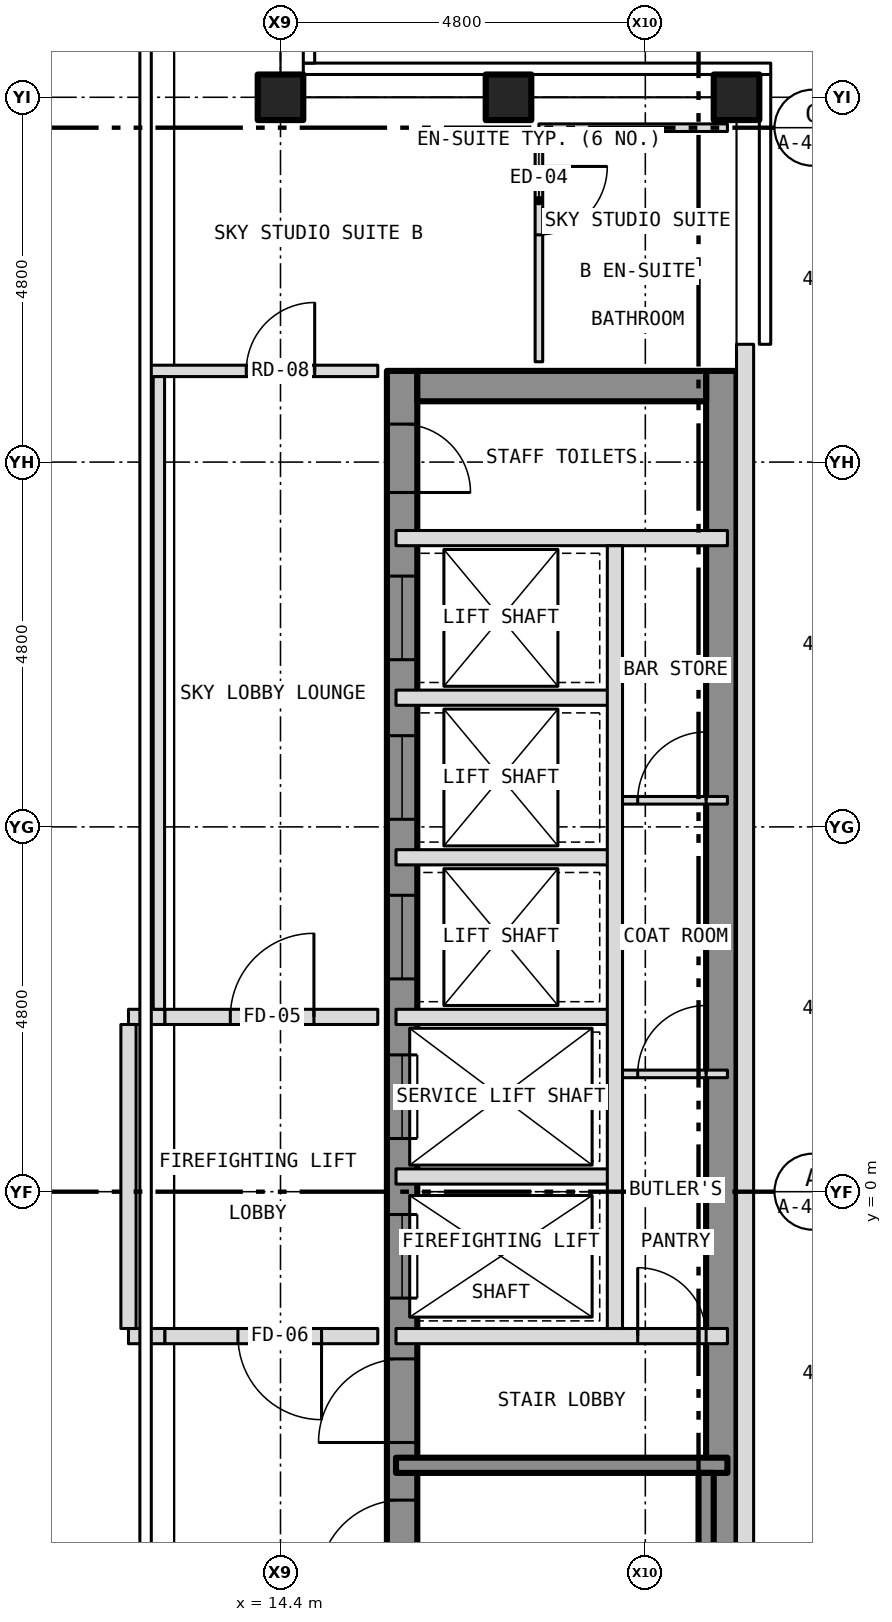
"""IFC4 building model, lengths in metres.
Left out: names, types, materials, properties, quantities, classifications, styles, units other than length and angle.
Written with IfcOpenShell. Run it as: python <this file> out.ifc"""

import sys

from ifc_helpers import new_model, si_unit, direction, frame, frame_2d, origin, origin_2d, place, context, subcontext, project, spatial, rectangle, hollow_rectangle, extrude, element, fill, save


model = new_model("IFC4")
c1 = context("Model", 3, precision=1e-05, world=origin(), true_north=direction((0.0, 1.0)))
c2 = subcontext(c1, "Body", "Model", "MODEL_VIEW")
j1 = project(units=[si_unit("LENGTHUNIT", "METRE"), si_unit("PLANEANGLEUNIT", "RADIAN")], contexts=[c1])
p1 = place(None, origin())
s1 = spatial("IfcSite", under=j1, at=p1, CompositionType="ELEMENT")
p2 = place(p1, origin())
s2 = spatial("IfcBuilding", under=s1, at=p2, CompositionType="ELEMENT")
p3 = place(p2, frame((0.0, 0.0, 286.5)))
s3 = spatial("IfcBuildingStorey", under=s2, at=p3, CompositionType="ELEMENT", Elevation=286.5)
for number, where, z_axis, x_axis in (
    (1, (20.4, 14.4, -0.15), (0.0, 0.0, 1.0), (1.0, 0.0, 0.0)),
    (2, (14.4, 14.4, -0.15), (0.0, 0.0, 1.0), (1.0, 0.0, 0.0)),
    (3, (17.4, 14.4, -0.15), (0.0, 0.0, 1.0), (1.0, 0.0, 0.0)),
):
    element("IfcColumn", number, at=place(p3, frame(where, z_axis=z_axis, x_axis=x_axis)), inside=s3, PredefinedType="COLUMN", context=c2, shape_type="SweptSolid", body=[
        extrude(hollow_rectangle(XDim=0.6, YDim=0.6, WallThickness=0.03, at=origin_2d()), origin(), (0.0, 0.0, 1.0), 3.45),
    ])
p4 = place(p3, frame((16.0, -10.8, 0.0), z_axis=(0.0, 0.0, 1.0), x_axis=(0.0, 1.0, 0.0)))
e4 = element("IfcWall", 4, at=p4, inside=s3, PredefinedType="SHEAR", context=c2, shape_type="SweptSolid", body=[
    extrude(rectangle(XDim=21.6, YDim=0.4, at=frame_2d((10.8, 0.0))), origin(), (0.0, 0.0, 1.0), 3.25),
])
p5 = place(p4, frame((9.4, 0.0, 0.0)))
e5 = element("IfcOpeningElement", 5, at=p5, cuts=e4, PredefinedType="OPENING", context=c2, shape_type="SweptSolid", body=[
    extrude(rectangle(XDim=1.1, YDim=2.1, at=frame_2d((0.55, 1.05))), frame((0.0, 0.212, 0.0), z_axis=(0.0, -1.0, 0.0), x_axis=(1.0, 0.0, 0.0)), (0.0, 0.0, 1.0), 0.424),
])
p6 = place(p4, frame((11.5, 0.0, 0.0)))
e6 = element("IfcOpeningElement", 6, at=p6, cuts=e4, PredefinedType="OPENING", context=c2, shape_type="SweptSolid", body=[
    extrude(rectangle(XDim=1.1, YDim=2.1, at=frame_2d((0.55, 1.05))), frame((0.0, 0.212, 0.0), z_axis=(0.0, -1.0, 0.0), x_axis=(1.0, 0.0, 0.0)), (0.0, 0.0, 1.0), 0.424),
])
p7 = place(p4, frame((13.6, 0.0, 0.0)))
e7 = element("IfcOpeningElement", 7, at=p7, cuts=e4, PredefinedType="OPENING", context=c2, shape_type="SweptSolid", body=[
    extrude(rectangle(XDim=1.1, YDim=2.1, at=frame_2d((0.55, 1.05))), frame((0.0, 0.212, 0.0), z_axis=(0.0, -1.0, 0.0), x_axis=(1.0, 0.0, 0.0)), (0.0, 0.0, 1.0), 0.424),
])
p8 = place(p4, frame((15.7, 0.0, 0.0)))
e8 = element("IfcOpeningElement", 8, at=p8, cuts=e4, PredefinedType="OPENING", context=c2, shape_type="SweptSolid", body=[
    extrude(rectangle(XDim=1.1, YDim=2.1, at=frame_2d((0.55, 1.05))), frame((0.0, 0.212, 0.0), z_axis=(0.0, -1.0, 0.0), x_axis=(1.0, 0.0, 0.0)), (0.0, 0.0, 1.0), 0.424),
])
p9 = place(p4, frame((17.8, 0.0, 0.0)))
e9 = element("IfcOpeningElement", 9, at=p9, cuts=e4, PredefinedType="OPENING", context=c2, shape_type="SweptSolid", body=[
    extrude(rectangle(XDim=1.1, YDim=2.1, at=frame_2d((0.55, 1.05))), frame((0.0, 0.212, 0.0), z_axis=(0.0, -1.0, 0.0), x_axis=(1.0, 0.0, 0.0)), (0.0, 0.0, 1.0), 0.424),
])
p10 = place(p4, frame((5.642, 0.0, 0.0)))
e10 = element("IfcOpeningElement", 10, at=p10, cuts=e4, PredefinedType="OPENING", context=c2, shape_type="SweptSolid", body=[
    extrude(rectangle(XDim=1.1, YDim=2.1, at=frame_2d((0.55, 1.05))), frame((0.0, 0.212, 0.0), z_axis=(0.0, -1.0, 0.0), x_axis=(1.0, 0.0, 0.0)), (0.0, 0.0, 1.0), 0.424),
])
p11 = place(p4, frame((7.5, 0.0, 0.0)))
e11 = element("IfcOpeningElement", 11, at=p11, cuts=e4, PredefinedType="OPENING", context=c2, shape_type="SweptSolid", body=[
    extrude(rectangle(XDim=1.1, YDim=2.1, at=frame_2d((0.55, 1.05))), frame((0.0, 0.212, 0.0), z_axis=(0.0, -1.0, 0.0), x_axis=(1.0, 0.0, 0.0)), (0.0, 0.0, 1.0), 0.424),
])
p12 = place(p4, frame((20.0, 0.0, 0.0)))
e12 = element("IfcOpeningElement", 12, at=p12, cuts=e4, PredefinedType="OPENING", context=c2, shape_type="SweptSolid", body=[
    extrude(rectangle(XDim=0.9, YDim=2.1, at=frame_2d((0.45, 1.05))), frame((0.0, 0.212, 0.0), z_axis=(0.0, -1.0, 0.0), x_axis=(1.0, 0.0, 0.0)), (0.0, 0.0, 1.0), 0.424),
])
p13 = place(p3, frame((20.2, -10.8, 0.0), z_axis=(0.0, 0.0, 1.0), x_axis=(0.0, 1.0, 0.0)))
e13 = element("IfcWall", 13, at=p13, inside=s3, PredefinedType="SHEAR", context=c2, shape_type="SweptSolid", body=[
    extrude(rectangle(XDim=21.6, YDim=0.4, at=frame_2d((10.8, 0.0))), origin(), (0.0, 0.0, 1.0), 3.25),
])
p14 = place(p3, frame((16.2, 10.6, 0.0), z_axis=(0.0, 0.0, 1.0), x_axis=(1.0, 0.0, 0.0)))
e14 = element("IfcWall", 14, at=p14, inside=s3, PredefinedType="SHEAR", context=c2, shape_type="SweptSolid", body=[
    extrude(rectangle(XDim=3.8, YDim=0.4, at=frame_2d((1.9, 0.0))), origin(), (0.0, 0.0, 1.0), 3.25),
])
p15 = place(p3, frame((20.512, -11.15, 0.0), z_axis=(0.0, 0.0, 1.0), x_axis=(0.0, 1.0, 0.0)))
e15 = element("IfcWall", 15, at=p15, inside=s3, PredefinedType="SOLIDWALL", context=c2, shape_type="SweptSolid", body=[
    extrude(rectangle(XDim=22.3, YDim=0.225, at=frame_2d((11.15, 0.0))), origin(), (0.0, 0.0, 1.0), 3.5),
])
p16 = place(p15, frame((3.3, 0.0, 1.0)))
e16 = element("IfcOpeningElement", 16, at=p16, cuts=e15, PredefinedType="OPENING", context=c2, shape_type="SweptSolid", body=[
    extrude(rectangle(XDim=0.6, YDim=1.5, at=frame_2d((0.3, 0.75))), frame((0.0, 0.125, 0.0), z_axis=(0.0, -1.0, 0.0), x_axis=(1.0, 0.0, 0.0)), (0.0, 0.0, 1.0), 0.249),
])
p17 = place(p3, frame((15.92, -3.6, 0.0), z_axis=(0.0, 0.0, 1.0), x_axis=(1.0, 0.0, 0.0)))
e17 = element("IfcWall", 17, at=p17, inside=s3, PredefinedType="SHEAR", context=c2, shape_type="SweptSolid", body=[
    extrude(rectangle(XDim=4.36, YDim=0.2, at=frame_2d((2.18, 0.0))), origin(), (0.0, 0.0, 1.0), 3.25),
])
p18 = place(p3, frame((12.4, -1.9, 0.0), z_axis=(0.0, 0.0, 1.0), x_axis=(1.0, 0.0, 0.0)))
e18 = element("IfcWall", 18, at=p18, inside=s3, PredefinedType="PARTITIONING", context=c2, shape_type="SweptSolid", body=[
    extrude(rectangle(XDim=0.48, YDim=0.2, at=frame_2d((0.24, 0.0))), origin(), (0.0, 0.0, 1.0), 3.3),
])
p19 = place(p3, frame((12.88, -1.9, 0.0), z_axis=(0.0, 0.0, 1.0), x_axis=(1.0, 0.0, 0.0)))
e19 = element("IfcWall", 19, at=p19, inside=s3, PredefinedType="PARTITIONING", context=c2, shape_type="SweptSolid", body=[
    extrude(rectangle(XDim=2.8, YDim=0.2, at=frame_2d((1.4, 0.0))), origin(), (0.0, 0.0, 1.0), 3.3),
])
p20 = place(p19, frame((0.96, 0.0, 0.0)))
e20 = element("IfcOpeningElement", 20, at=p20, cuts=e19, PredefinedType="OPENING", context=c2, shape_type="SweptSolid", body=[
    extrude(rectangle(XDim=1.1, YDim=2.1, at=frame_2d((0.55, 1.05))), frame((0.0, 0.112, 0.0), z_axis=(0.0, -1.0, 0.0), x_axis=(1.0, 0.0, 0.0)), (0.0, 0.0, 1.0), 0.224),
])
p21 = place(p3, frame((15.92, -1.9, 0.0), z_axis=(0.0, 0.0, 1.0), x_axis=(1.0, 0.0, 0.0)))
e21 = element("IfcWall", 21, at=p21, inside=s3, PredefinedType="PARTITIONING", context=c2, shape_type="SweptSolid", body=[
    extrude(rectangle(XDim=4.36, YDim=0.2, at=frame_2d((2.18, 0.0))), origin(), (0.0, 0.0, 1.0), 3.25),
])
p22 = place(p21, frame((3.18, 0.0, 0.0)))
e22 = element("IfcOpeningElement", 22, at=p22, cuts=e21, PredefinedType="OPENING", context=c2, shape_type="SweptSolid", body=[
    extrude(rectangle(XDim=0.9, YDim=2.1, at=frame_2d((0.45, 1.05))), frame((0.0, 0.112, 0.0), z_axis=(0.0, -1.0, 0.0), x_axis=(1.0, 0.0, 0.0)), (0.0, 0.0, 1.0), 0.224),
])
p23 = place(p3, frame((15.92, 0.2, 0.0), z_axis=(0.0, 0.0, 1.0), x_axis=(1.0, 0.0, 0.0)))
e23 = element("IfcWall", 23, at=p23, inside=s3, PredefinedType="PARTITIONING", context=c2, shape_type="SweptSolid", body=[
    extrude(rectangle(XDim=2.88, YDim=0.2, at=frame_2d((1.44, 0.0))), origin(), (0.0, 0.0, 1.0), 3.25),
])
p24 = place(p3, frame((18.8, 1.55, 0.0), z_axis=(0.0, 0.0, 1.0), x_axis=(1.0, 0.0, 0.0)))
e24 = element("IfcWall", 24, at=p24, inside=s3, PredefinedType="PARTITIONING", context=c2, shape_type="SweptSolid", body=[
    extrude(rectangle(XDim=1.48, YDim=0.1, at=frame_2d((0.74, 0.0))), origin(), (0.0, 0.0, 1.0), 3.25),
])
p25 = place(p24, frame((0.3, 0.0, 0.0)))
e25 = element("IfcOpeningElement", 25, at=p25, cuts=e24, PredefinedType="OPENING", context=c2, shape_type="SweptSolid", body=[
    extrude(rectangle(XDim=0.9, YDim=2.1, at=frame_2d((0.45, 1.05))), frame((0.0, 0.062, 0.0), z_axis=(0.0, -1.0, 0.0), x_axis=(1.0, 0.0, 0.0)), (0.0, 0.0, 1.0), 0.124),
])
p26 = place(p3, frame((12.4, 2.3, 0.0), z_axis=(0.0, 0.0, 1.0), x_axis=(1.0, 0.0, 0.0)))
e26 = element("IfcWall", 26, at=p26, inside=s3, PredefinedType="PARTITIONING", context=c2, shape_type="SweptSolid", body=[
    extrude(rectangle(XDim=0.48, YDim=0.2, at=frame_2d((0.24, 0.0))), origin(), (0.0, 0.0, 1.0), 3.3),
])
p27 = place(p3, frame((12.88, 2.3, 0.0), z_axis=(0.0, 0.0, 1.0), x_axis=(1.0, 0.0, 0.0)))
e27 = element("IfcWall", 27, at=p27, inside=s3, PredefinedType="PARTITIONING", context=c2, shape_type="SweptSolid", body=[
    extrude(rectangle(XDim=2.8, YDim=0.2, at=frame_2d((1.4, 0.0))), origin(), (0.0, 0.0, 1.0), 3.3),
])
p28 = place(p27, frame((0.86, 0.0, 0.0)))
e28 = element("IfcOpeningElement", 28, at=p28, cuts=e27, PredefinedType="OPENING", context=c2, shape_type="SweptSolid", body=[
    extrude(rectangle(XDim=1.1, YDim=2.1, at=frame_2d((0.55, 1.05))), frame((0.0, 0.112, 0.0), z_axis=(0.0, -1.0, 0.0), x_axis=(1.0, 0.0, 0.0)), (0.0, 0.0, 1.0), 0.224),
])
for number, where, z_axis, x_axis in (
    (29, (15.92, 2.3, 0.0), (0.0, 0.0, 1.0), (1.0, 0.0, 0.0)),
    (30, (15.92, 4.4, 0.0), (0.0, 0.0, 1.0), (1.0, 0.0, 0.0)),
):
    element("IfcWall", number, at=place(p3, frame(where, z_axis=z_axis, x_axis=x_axis)), inside=s3, PredefinedType="PARTITIONING", context=c2, shape_type="SweptSolid", body=[
        extrude(rectangle(XDim=2.88, YDim=0.2, at=frame_2d((1.44, 0.0))), origin(), (0.0, 0.0, 1.0), 3.25),
    ])
p29 = place(p3, frame((18.8, 5.15, 0.0), z_axis=(0.0, 0.0, 1.0), x_axis=(1.0, 0.0, 0.0)))
e31 = element("IfcWall", 31, at=p29, inside=s3, PredefinedType="PARTITIONING", context=c2, shape_type="SweptSolid", body=[
    extrude(rectangle(XDim=1.48, YDim=0.1, at=frame_2d((0.74, 0.0))), origin(), (0.0, 0.0, 1.0), 3.25),
])
p30 = place(p29, frame((0.3, 0.0, 0.0)))
e32 = element("IfcOpeningElement", 32, at=p30, cuts=e31, PredefinedType="OPENING", context=c2, shape_type="SweptSolid", body=[
    extrude(rectangle(XDim=0.9, YDim=2.1, at=frame_2d((0.45, 1.05))), frame((0.0, 0.062, 0.0), z_axis=(0.0, -1.0, 0.0), x_axis=(1.0, 0.0, 0.0)), (0.0, 0.0, 1.0), 0.124),
])
p31 = place(p3, frame((15.92, 6.5, 0.0), z_axis=(0.0, 0.0, 1.0), x_axis=(1.0, 0.0, 0.0)))
e33 = element("IfcWall", 33, at=p31, inside=s3, PredefinedType="PARTITIONING", context=c2, shape_type="SweptSolid", body=[
    extrude(rectangle(XDim=2.88, YDim=0.2, at=frame_2d((1.44, 0.0))), origin(), (0.0, 0.0, 1.0), 3.25),
])
p32 = place(p3, frame((15.92, 8.6, 0.0), z_axis=(0.0, 0.0, 1.0), x_axis=(1.0, 0.0, 0.0)))
e34 = element("IfcWall", 34, at=p32, inside=s3, PredefinedType="PARTITIONING", context=c2, shape_type="SweptSolid", body=[
    extrude(rectangle(XDim=4.36, YDim=0.2, at=frame_2d((2.18, 0.0))), origin(), (0.0, 0.0, 1.0), 3.25),
])
p33 = place(p3, frame((12.67, 10.8, 0.0), z_axis=(0.0, 0.0, 1.0), x_axis=(1.0, 0.0, 0.0)))
e35 = element("IfcWall", 35, at=p33, inside=s3, PredefinedType="PARTITIONING", context=c2, shape_type="SweptSolid", body=[
    extrude(rectangle(XDim=3.01, YDim=0.15, at=frame_2d((1.505, 0.0))), origin(), (0.0, 0.0, 1.0), 3.3),
])
p34 = place(p33, frame((1.28, 0.0, 0.0)))
e36 = element("IfcOpeningElement", 36, at=p34, cuts=e35, PredefinedType="OPENING", context=c2, shape_type="SweptSolid", body=[
    extrude(rectangle(XDim=0.9, YDim=2.1, at=frame_2d((0.45, 1.05))), frame((0.0, 0.087, 0.0), z_axis=(0.0, -1.0, 0.0), x_axis=(1.0, 0.0, 0.0)), (0.0, 0.0, 1.0), 0.174),
])
p35 = place(p3, frame((17.8, 14.0, 0.0), z_axis=(0.0, 0.0, 1.0), x_axis=(1.0, 0.0, 0.0)))
e37 = element("IfcWall", 37, at=p35, inside=s3, PredefinedType="PARTITIONING", context=c2, shape_type="SweptSolid", body=[
    extrude(rectangle(XDim=2.48, YDim=0.1, at=frame_2d((1.24, 0.0))), origin(), (0.0, 0.0, 1.0), 3.3),
])
p36 = place(p3, frame((12.4, -1.8, 0.0), z_axis=(0.0, 0.0, 1.0), x_axis=(0.0, 1.0, 0.0)))
e38 = element("IfcWall", 38, at=p36, inside=s3, PredefinedType="PARTITIONING", context=c2, shape_type="SweptSolid", body=[
    extrude(rectangle(XDim=4.0, YDim=0.2, at=frame_2d((2.0, 0.0))), origin(), (0.0, 0.0, 1.0), 3.3),
])
p37 = place(p3, frame((12.8, 2.4, 0.0), z_axis=(0.0, 0.0, 1.0), x_axis=(0.0, 1.0, 0.0)))
e39 = element("IfcWall", 39, at=p37, inside=s3, PredefinedType="PARTITIONING", context=c2, shape_type="SweptSolid", body=[
    extrude(rectangle(XDim=8.325, YDim=0.15, at=frame_2d((4.163, 0.0))), origin(), (0.0, 0.0, 1.0), 3.3),
])
p38 = place(p3, frame((17.8, 10.92, 0.0), z_axis=(0.0, 0.0, 1.0), x_axis=(0.0, 1.0, 0.0)))
e40 = element("IfcWall", 40, at=p38, inside=s3, PredefinedType="PARTITIONING", context=c2, shape_type="SweptSolid", body=[
    extrude(rectangle(XDim=3.03, YDim=0.1, at=frame_2d((1.515, 0.0))), origin(), (0.0, 0.0, 1.0), 3.3),
])
p39 = place(p38, frame((1.67, 0.0, 0.0)))
e41 = element("IfcOpeningElement", 41, at=p39, cuts=e40, PredefinedType="OPENING", context=c2, shape_type="SweptSolid", body=[
    extrude(rectangle(XDim=0.9, YDim=2.1, at=frame_2d((0.45, 1.05))), frame((0.0, 0.062, 0.0), z_axis=(0.0, -1.0, 0.0), x_axis=(1.0, 0.0, 0.0)), (0.0, 0.0, 1.0), 0.124),
])
p40 = place(p3, frame((18.8, -1.8, 0.0), z_axis=(0.0, 0.0, 1.0), x_axis=(0.0, 1.0, 0.0)))
e42 = element("IfcWall", 42, at=p40, inside=s3, PredefinedType="PARTITIONING", context=c2, shape_type="SweptSolid", body=[
    extrude(rectangle(XDim=10.3, YDim=0.2, at=frame_2d((5.15, 0.0))), origin(), (0.0, 0.0, 1.0), 3.25),
])
p41 = place(p3, frame((20.0, -10.68, 0.0), z_axis=(0.0, 0.0, 1.0), x_axis=(0.0, 1.0, 0.0)))
e43 = element("IfcWall", 43, at=p41, inside=s3, PredefinedType="SHEAR", context=c2, shape_type="SweptSolid", body=[
    extrude(rectangle(XDim=6.98, YDim=0.2, at=frame_2d((3.49, 0.0))), origin(), (0.0, 0.0, 1.0), 3.25),
])
p42 = place(p2, frame((0.0, 0.0, 290.0)))
p43 = place(p42, frame((0.0, 0.0, -0.25)))
p44 = place(p43, frame((19.0, -4.64, 0.0)))
p45 = place(p44, frame((0.0, 0.0, 0.2)))
e44 = element("IfcWindow", 44, at=p45, inside=s3, PartitioningType="SINGLE_PANEL", PredefinedType="SKYLIGHT", context=c2, shape_type="SweptSolid", body=[
    extrude(rectangle(XDim=0.9, YDim=0.9, at=origin_2d()), origin(), (0.0, 0.0, 1.0), 0.05),
])
p46 = place(p5, origin())
e45 = element("IfcDoor", 45, at=p46, inside=s3, OperationType="SLIDING_TO_LEFT", PredefinedType="DOOR", context=c2, shape_type="SweptSolid", body=[
    extrude(rectangle(XDim=1.1, YDim=2.1, at=frame_2d((0.55, 1.05))), frame((0.0, 0.025, 0.0), z_axis=(0.0, -1.0, 0.0), x_axis=(1.0, 0.0, 0.0)), (0.0, 0.0, 1.0), 0.05),
])
fill(e5, e45)
p47 = place(p6, origin())
e46 = element("IfcDoor", 46, at=p47, inside=s3, OperationType="SLIDING_TO_LEFT", PredefinedType="DOOR", context=c2, shape_type="SweptSolid", body=[
    extrude(rectangle(XDim=1.1, YDim=2.1, at=frame_2d((0.55, 1.05))), frame((0.0, 0.025, 0.0), z_axis=(0.0, -1.0, 0.0), x_axis=(1.0, 0.0, 0.0)), (0.0, 0.0, 1.0), 0.05),
])
fill(e6, e46)
p48 = place(p7, origin())
e47 = element("IfcDoor", 47, at=p48, inside=s3, OperationType="SLIDING_TO_LEFT", PredefinedType="DOOR", context=c2, shape_type="SweptSolid", body=[
    extrude(rectangle(XDim=1.1, YDim=2.1, at=frame_2d((0.55, 1.05))), frame((0.0, 0.025, 0.0), z_axis=(0.0, -1.0, 0.0), x_axis=(1.0, 0.0, 0.0)), (0.0, 0.0, 1.0), 0.05),
])
fill(e7, e47)
p49 = place(p8, origin())
e48 = element("IfcDoor", 48, at=p49, inside=s3, OperationType="SLIDING_TO_LEFT", PredefinedType="DOOR", context=c2, shape_type="SweptSolid", body=[
    extrude(rectangle(XDim=1.1, YDim=2.1, at=frame_2d((0.55, 1.05))), frame((0.0, 0.025, 0.0), z_axis=(0.0, -1.0, 0.0), x_axis=(1.0, 0.0, 0.0)), (0.0, 0.0, 1.0), 0.05),
])
fill(e8, e48)
p50 = place(p9, origin())
e49 = element("IfcDoor", 49, at=p50, inside=s3, OperationType="SLIDING_TO_LEFT", PredefinedType="DOOR", context=c2, shape_type="SweptSolid", body=[
    extrude(rectangle(XDim=1.1, YDim=2.1, at=frame_2d((0.55, 1.05))), frame((0.0, 0.025, 0.0), z_axis=(0.0, -1.0, 0.0), x_axis=(1.0, 0.0, 0.0)), (0.0, 0.0, 1.0), 0.05),
])
fill(e9, e49)
p51 = place(p10, origin())
e50 = element("IfcDoor", 50, at=p51, inside=s3, OperationType="SINGLE_SWING_LEFT", PredefinedType="DOOR", context=c2, shape_type="SweptSolid", body=[
    extrude(rectangle(XDim=1.1, YDim=2.1, at=frame_2d((0.55, 1.05))), frame((0.0, 0.025, 0.0), z_axis=(0.0, -1.0, 0.0), x_axis=(1.0, 0.0, 0.0)), (0.0, 0.0, 1.0), 0.05),
])
fill(e10, e50)
p52 = place(p11, origin())
e51 = element("IfcDoor", 51, at=p52, inside=s3, OperationType="SINGLE_SWING_LEFT", PredefinedType="DOOR", context=c2, shape_type="SweptSolid", body=[
    extrude(rectangle(XDim=1.1, YDim=2.1, at=frame_2d((0.55, 1.05))), frame((0.0, 0.025, 0.0), z_axis=(0.0, -1.0, 0.0), x_axis=(1.0, 0.0, 0.0)), (0.0, 0.0, 1.0), 0.05),
])
fill(e11, e51)
p53 = place(p12, origin())
e52 = element("IfcDoor", 52, at=p53, inside=s3, OperationType="SINGLE_SWING_LEFT", PredefinedType="DOOR", context=c2, shape_type="SweptSolid", body=[
    extrude(rectangle(XDim=0.9, YDim=2.1, at=frame_2d((0.45, 1.05))), frame((0.0, 0.025, 0.0), z_axis=(0.0, -1.0, 0.0), x_axis=(1.0, 0.0, 0.0)), (0.0, 0.0, 1.0), 0.05),
])
fill(e12, e52)
p54 = place(p22, origin())
e53 = element("IfcDoor", 53, at=p54, inside=s3, OperationType="SINGLE_SWING_LEFT", PredefinedType="DOOR", context=c2, shape_type="SweptSolid", body=[
    extrude(rectangle(XDim=0.9, YDim=2.1, at=frame_2d((0.45, 1.05))), frame((0.0, 0.025, 0.0), z_axis=(0.0, -1.0, 0.0), x_axis=(1.0, 0.0, 0.0)), (0.0, 0.0, 1.0), 0.05),
])
fill(e22, e53)
p55 = place(p25, origin())
e54 = element("IfcDoor", 54, at=p55, inside=s3, OperationType="SINGLE_SWING_RIGHT", PredefinedType="DOOR", context=c2, shape_type="SweptSolid", body=[
    extrude(rectangle(XDim=0.9, YDim=2.1, at=frame_2d((0.45, 1.05))), frame((0.0, 0.025, 0.0), z_axis=(0.0, -1.0, 0.0), x_axis=(1.0, 0.0, 0.0)), (0.0, 0.0, 1.0), 0.05),
])
fill(e25, e54)
p56 = place(p30, origin())
e55 = element("IfcDoor", 55, at=p56, inside=s3, OperationType="SINGLE_SWING_RIGHT", PredefinedType="DOOR", context=c2, shape_type="SweptSolid", body=[
    extrude(rectangle(XDim=0.9, YDim=2.1, at=frame_2d((0.45, 1.05))), frame((0.0, 0.025, 0.0), z_axis=(0.0, -1.0, 0.0), x_axis=(1.0, 0.0, 0.0)), (0.0, 0.0, 1.0), 0.05),
])
fill(e32, e55)
p57 = place(p28, origin())
e56 = element("IfcDoor", 56, at=p57, inside=s3, OperationType="SINGLE_SWING_RIGHT", PredefinedType="DOOR", context=c2, shape_type="SweptSolid", body=[
    extrude(rectangle(XDim=1.1, YDim=2.1, at=frame_2d((0.55, 1.05))), frame((0.0, 0.025, 0.0), z_axis=(0.0, -1.0, 0.0), x_axis=(1.0, 0.0, 0.0)), (0.0, 0.0, 1.0), 0.05),
])
fill(e28, e56)
p58 = place(p20, origin())
e57 = element("IfcDoor", 57, at=p58, inside=s3, OperationType="SINGLE_SWING_RIGHT", PredefinedType="DOOR", context=c2, shape_type="SweptSolid", body=[
    extrude(rectangle(XDim=1.1, YDim=2.1, at=frame_2d((0.55, 1.05))), frame((0.0, 0.025, 0.0), z_axis=(0.0, -1.0, 0.0), x_axis=(1.0, 0.0, 0.0)), (0.0, 0.0, 1.0), 0.05),
])
fill(e20, e57)
p59 = place(p34, origin())
e58 = element("IfcDoor", 58, at=p59, inside=s3, OperationType="SINGLE_SWING_RIGHT", PredefinedType="DOOR", context=c2, shape_type="SweptSolid", body=[
    extrude(rectangle(XDim=0.9, YDim=2.1, at=frame_2d((0.45, 1.05))), frame((0.0, 0.025, 0.0), z_axis=(0.0, -1.0, 0.0), x_axis=(1.0, 0.0, 0.0)), (0.0, 0.0, 1.0), 0.05),
])
fill(e36, e58)
p60 = place(p39, origin())
e59 = element("IfcDoor", 59, at=p60, inside=s3, OperationType="SINGLE_SWING_RIGHT", PredefinedType="DOOR", context=c2, shape_type="SweptSolid", body=[
    extrude(rectangle(XDim=0.9, YDim=2.1, at=frame_2d((0.45, 1.05))), frame((0.0, 0.025, 0.0), z_axis=(0.0, -1.0, 0.0), x_axis=(1.0, 0.0, 0.0)), (0.0, 0.0, 1.0), 0.05),
])
fill(e41, e59)
save(model, sys.argv[1])
